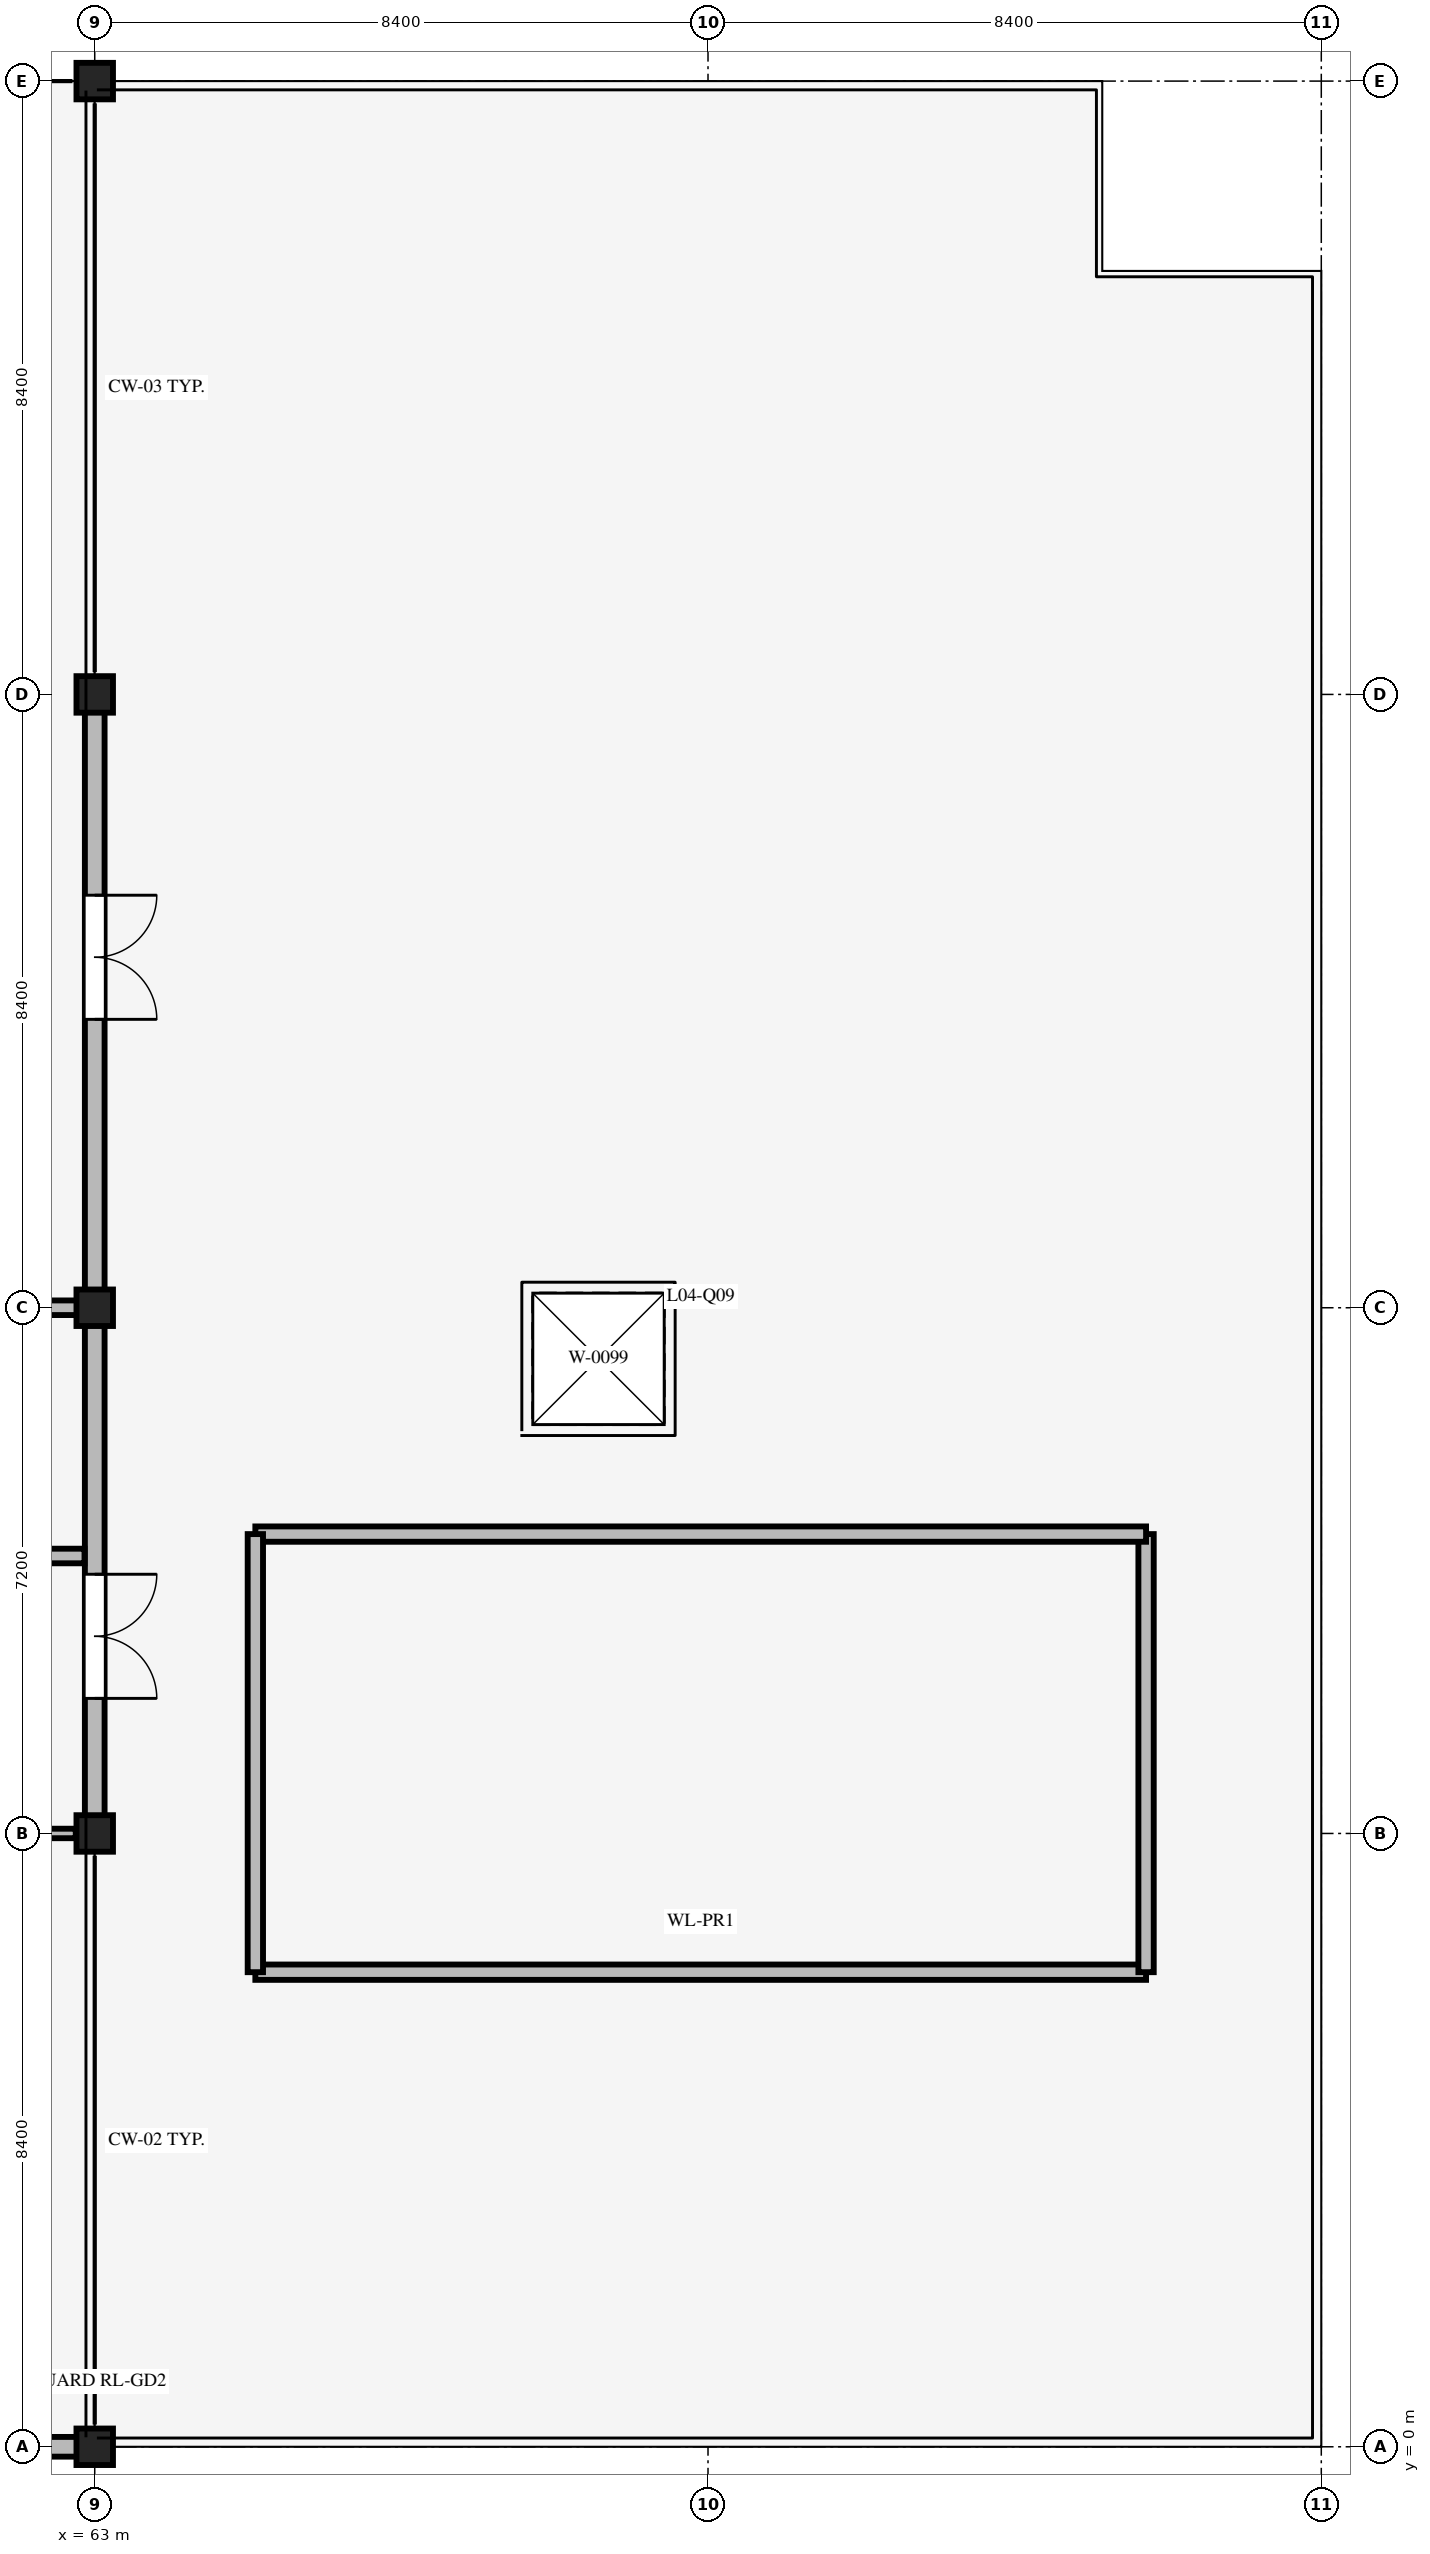
"""IFC4 building model, lengths in metres.
Left out: names, types, materials, properties, quantities, classifications, styles, units other than length and angle.
Written with IfcOpenShell. Run it as: python <this file> out.ifc"""

import sys

from ifc_helpers import new_model, si_unit, direction, frame, frame_2d, origin, origin_2d, place, context, subcontext, project, spatial, rectangle, extrude, element, fill, save


model = new_model("IFC4")
c1 = context("Model", 3, precision=1e-05, world=origin(), true_north=direction((0.0, 1.0)))
c2 = subcontext(c1, "Body", "Model", "MODEL_VIEW")
j1 = project(units=[si_unit("LENGTHUNIT", "METRE"), si_unit("PLANEANGLEUNIT", "RADIAN")], contexts=[c1])
p1 = place(None, origin())
s1 = spatial("IfcSite", under=j1, at=p1, CompositionType="ELEMENT")
p2 = place(p1, origin())
s2 = spatial("IfcBuilding", under=s1, at=p2, CompositionType="ELEMENT")
p3 = place(p2, frame((0.0, 0.0, 19.8)))
s3 = spatial("IfcBuildingStorey", under=s2, at=p3, CompositionType="ELEMENT", Elevation=19.8)
for number, where, z_axis, x_axis in (
    (1, (63.0, 0.0, 0.0), (0.0, 0.0, 1.0), (1.0, 0.0, 0.0)),
    (2, (63.0, 8.4, 0.0), (0.0, 0.0, 1.0), (1.0, 0.0, 0.0)),
    (3, (63.0, 15.6, 0.0), (0.0, 0.0, 1.0), (1.0, 0.0, 0.0)),
    (4, (63.0, 24.0, 0.0), (0.0, 0.0, 1.0), (1.0, 0.0, 0.0)),
    (5, (63.0, 32.4, 0.0), (0.0, 0.0, 1.0), (1.0, 0.0, 0.0)),
):
    element("IfcColumn", number, at=place(p3, frame(where, z_axis=z_axis, x_axis=x_axis)), inside=s3, PredefinedType="COLUMN", context=c2, shape_type="SweptSolid", body=[
        extrude(rectangle(XDim=0.5, YDim=0.5, at=origin_2d()), origin(), (0.0, 0.0, 1.0), 3.9),
    ])
p4 = place(p3, frame((62.76, 0.0, 0.0), z_axis=(0.0, 0.0, 1.0), x_axis=(-1.0, 0.0, 0.0)))
e6 = element("IfcWall", 6, at=p4, inside=s3, PredefinedType="STANDARD", context=c2, shape_type="SweptSolid", body=[
    extrude(rectangle(XDim=8.4, YDim=0.27, at=frame_2d((4.2, 0.0))), origin(), (0.0, 0.0, 1.0), 4.8),
])
p5 = place(p4, frame((1.01, 0.0, 0.9)))
e7 = element("IfcOpeningElement", 7, at=p5, cuts=e6, PredefinedType="OPENING", context=c2, shape_type="SweptSolid", body=[
    extrude(rectangle(XDim=3.2, YDim=2.1, at=frame_2d((1.6, 1.05))), frame((0.0, 0.145, 0.0), z_axis=(0.0, -1.0, 0.0), x_axis=(1.0, 0.0, 0.0)), (0.0, 0.0, 1.0), 0.29),
])
p6 = place(p3, frame((63.0, 15.36, 0.0), z_axis=(0.0, 0.0, 1.0), x_axis=(0.0, -1.0, 0.0)))
e8 = element("IfcWall", 8, at=p6, inside=s3, PredefinedType="STANDARD", context=c2, shape_type="SweptSolid", body=[
    extrude(rectangle(XDim=6.72, YDim=0.27, at=frame_2d((3.36, 0.0))), origin(), (0.0, 0.0, 1.0), 3.285),
])
p7 = place(p6, frame((3.41, 0.0, 0.0)))
e9 = element("IfcOpeningElement", 9, at=p7, cuts=e8, PredefinedType="OPENING", context=c2, shape_type="SweptSolid", body=[
    extrude(rectangle(XDim=1.7, YDim=2.3, at=frame_2d((0.85, 1.15))), frame((0.0, 0.145, 0.0), z_axis=(0.0, -1.0, 0.0), x_axis=(1.0, 0.0, 0.0)), (0.0, 0.0, 1.0), 0.29),
])
p8 = place(p3, frame((63.0, 23.76, 0.0), z_axis=(0.0, 0.0, 1.0), x_axis=(0.0, -1.0, 0.0)))
e10 = element("IfcWall", 10, at=p8, inside=s3, PredefinedType="STANDARD", context=c2, shape_type="SweptSolid", body=[
    extrude(rectangle(XDim=8.395, YDim=0.27, at=frame_2d((4.198, 0.0))), origin(), (0.0, 0.0, 1.0), 3.285),
])
p9 = place(p8, frame((2.51, 0.0, 0.0)))
e11 = element("IfcOpeningElement", 11, at=p9, cuts=e10, PredefinedType="OPENING", context=c2, shape_type="SweptSolid", body=[
    extrude(rectangle(XDim=1.7, YDim=2.3, at=frame_2d((0.85, 1.15))), frame((0.0, 0.145, 0.0), z_axis=(0.0, -1.0, 0.0), x_axis=(1.0, 0.0, 0.0)), (0.0, 0.0, 1.0), 0.29),
])
p10 = place(p3, frame((65.2, 6.5, 0.0), z_axis=(0.0, 0.0, 1.0), x_axis=(1.0, 0.0, 0.0)))
e12 = element("IfcWall", 12, at=p10, inside=s3, PredefinedType="PARAPET", context=c2, shape_type="SweptSolid", body=[
    extrude(rectangle(XDim=12.2, YDim=0.21, at=frame_2d((6.1, 0.0))), origin(), (0.0, 0.0, 1.0), 0.55),
])
p11 = place(p3, frame((77.4, 6.5, 0.0), z_axis=(0.0, 0.0, 1.0), x_axis=(0.0, 1.0, 0.0)))
e13 = element("IfcWall", 13, at=p11, inside=s3, PredefinedType="PARAPET", context=c2, shape_type="SweptSolid", body=[
    extrude(rectangle(XDim=6.0, YDim=0.21, at=frame_2d((3.0, 0.0))), origin(), (0.0, 0.0, 1.0), 0.55),
])
p12 = place(p3, frame((77.4, 12.5, 0.0), z_axis=(0.0, 0.0, 1.0), x_axis=(-1.0, 0.0, 0.0)))
e14 = element("IfcWall", 14, at=p12, inside=s3, PredefinedType="PARAPET", context=c2, shape_type="SweptSolid", body=[
    extrude(rectangle(XDim=12.2, YDim=0.21, at=frame_2d((6.1, 0.0))), origin(), (0.0, 0.0, 1.0), 0.55),
])
p13 = place(p3, frame((65.2, 12.5, 0.0), z_axis=(0.0, 0.0, 1.0), x_axis=(0.0, -1.0, 0.0)))
e15 = element("IfcWall", 15, at=p13, inside=s3, PredefinedType="PARAPET", context=c2, shape_type="SweptSolid", body=[
    extrude(rectangle(XDim=6.0, YDim=0.21, at=frame_2d((3.0, 0.0))), origin(), (0.0, 0.0, 1.0), 0.55),
])
p14 = place(p3, frame((54.86, 15.6, 0.0), z_axis=(0.0, 0.0, 1.0), x_axis=(1.0, 0.0, 0.0)))
e16 = element("IfcWall", 16, at=p14, inside=s3, PredefinedType="STANDARD", context=c2, shape_type="SweptSolid", body=[
    extrude(rectangle(XDim=8.0, YDim=0.2, at=frame_2d((4.0, 0.0))), origin(), (0.0, 0.0, 1.0), 2.9),
])
p15 = place(p14, frame((3.165, 0.0, 0.0)))
e17 = element("IfcOpeningElement", 17, at=p15, cuts=e16, PredefinedType="OPENING", context=c2, shape_type="SweptSolid", body=[
    extrude(rectangle(XDim=1.55, YDim=2.25, at=frame_2d((0.775, 1.125))), frame((0.0, 0.11, 0.0), z_axis=(0.0, -1.0, 0.0), x_axis=(1.0, 0.0, 0.0)), (0.0, 0.0, 1.0), 0.22),
])
p16 = place(p3, frame((57.05, 12.2, 0.0), z_axis=(0.0, 0.0, 1.0), x_axis=(1.0, 0.0, 0.0)))
e18 = element("IfcWall", 18, at=p16, inside=s3, PredefinedType="STANDARD", context=c2, shape_type="SweptSolid", body=[
    extrude(rectangle(XDim=5.81, YDim=0.2, at=frame_2d((2.905, 0.0))), origin(), (0.0, 0.0, 1.0), 2.9),
])
p17 = place(p16, frame((2.365, 0.0, 0.0)))
e19 = element("IfcOpeningElement", 19, at=p17, cuts=e18, PredefinedType="OPENING", context=c2, shape_type="SweptSolid", body=[
    extrude(rectangle(XDim=1.02, YDim=2.15, at=frame_2d((0.51, 1.075))), frame((0.0, 0.11, 0.0), z_axis=(0.0, -1.0, 0.0), x_axis=(1.0, 0.0, 0.0)), (0.0, 0.0, 1.0), 0.22),
])
p18 = place(p3, frame((57.05, 8.4, 0.0), z_axis=(0.0, 0.0, 1.0), x_axis=(1.0, 0.0, 0.0)))
e20 = element("IfcWall", 20, at=p18, inside=s3, PredefinedType="STANDARD", context=c2, shape_type="SweptSolid", body=[
    extrude(rectangle(XDim=5.69, YDim=0.13, at=frame_2d((2.845, 0.0))), origin(), (0.0, 0.0, 1.0), 2.9),
])
p19 = place(p7, origin())
e21 = element("IfcDoor", 21, at=p19, inside=s3, OperationType="DOUBLE_DOOR_SINGLE_SWING", PredefinedType="DOOR", context=c2, shape_type="SweptSolid", body=[
    extrude(rectangle(XDim=1.7, YDim=2.3, at=frame_2d((0.85, 1.15))), frame((0.0, 0.025, 0.0), z_axis=(0.0, -1.0, 0.0), x_axis=(1.0, 0.0, 0.0)), (0.0, 0.0, 1.0), 0.05),
])
fill(e9, e21)
p20 = place(p9, origin())
e22 = element("IfcDoor", 22, at=p20, inside=s3, OperationType="DOUBLE_DOOR_SINGLE_SWING", PredefinedType="DOOR", context=c2, shape_type="SweptSolid", body=[
    extrude(rectangle(XDim=1.7, YDim=2.3, at=frame_2d((0.85, 1.15))), frame((0.0, 0.025, 0.0), z_axis=(0.0, -1.0, 0.0), x_axis=(1.0, 0.0, 0.0)), (0.0, 0.0, 1.0), 0.05),
])
fill(e11, e22)
p21 = place(p3, frame((0.0, 0.0, -0.33)))
p22 = place(p21, frame((69.9, 14.9, 0.0)))
p23 = place(p22, frame((0.0, 0.0, 0.28)))
e23 = element("IfcWindow", 23, at=p23, inside=s3, PartitioningType="SINGLE_PANEL", PredefinedType="SKYLIGHT", context=c2, shape_type="SweptSolid", body=[
    extrude(rectangle(XDim=1.8, YDim=1.8, at=origin_2d()), origin(), (0.0, 0.0, 1.0), 0.05),
])
save(model, sys.argv[1])
